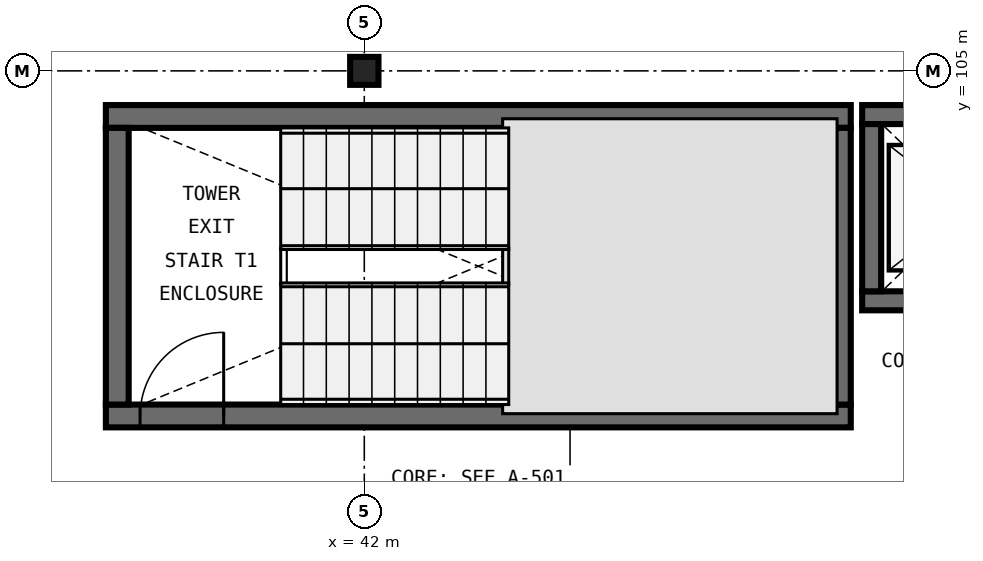
"""IFC4 building model, lengths in metres.
Left out: names, types, materials, properties, quantities, classifications, styles, units other than length and angle.
Written with IfcOpenShell. Run it as: python <this file> out.ifc"""

import sys

from ifc_helpers import new_model, si_unit, direction, frame, frame_2d, origin, origin_2d, place, context, subcontext, project, spatial, rectangle, i_section, extrude, element, fill, save


model = new_model("IFC4")
c1 = context("Model", 3, precision=1e-05, world=origin(), true_north=direction((0.0, 1.0)))
c2 = subcontext(c1, "Body", "Model", "MODEL_VIEW")
j1 = project(units=[si_unit("LENGTHUNIT", "METRE"), si_unit("PLANEANGLEUNIT", "RADIAN")], contexts=[c1])
p1 = place(None, origin())
s1 = spatial("IfcSite", under=j1, at=p1, CompositionType="ELEMENT")
p2 = place(p1, origin())
s2 = spatial("IfcBuilding", under=s1, at=p2, CompositionType="ELEMENT")
p3 = place(p2, frame((0.0, 0.0, 67.2)))
s3 = spatial("IfcBuildingStorey", under=s2, at=p3, CompositionType="ELEMENT", Elevation=67.2)
p4 = place(p3, frame((42.0, 105.0, 0.0), z_axis=(0.0, 0.0, 1.0), x_axis=(1.0, 0.0, 0.0)))
e1 = element("IfcColumn", 1, at=p4, inside=s3, PredefinedType="COLUMN", context=c2, shape_type="SweptSolid", body=[
    extrude(i_section(OverallWidth=0.373, OverallDepth=0.368, WebThickness=0.015, FlangeThickness=0.024, FilletRadius=0.031, at=origin_2d()), origin(), (0.0, 0.0, 1.0), 3.6),
])
p5 = place(p3, frame((38.6, 100.46, 0.0), z_axis=(0.0, 0.0, 1.0), x_axis=(1.0, 0.0, 0.0)))
e2 = element("IfcWall", 2, at=p5, inside=s3, PredefinedType="SHEAR", context=c2, shape_type="SweptSolid", body=[
    extrude(rectangle(XDim=9.8, YDim=0.3, at=frame_2d((4.9, 0.0))), origin(), (0.0, 0.0, 1.0), 3.6),
])
p6 = place(p5, frame((0.45, 0.0, 0.0)))
e3 = element("IfcOpeningElement", 3, at=p6, cuts=e2, PredefinedType="OPENING", context=c2, shape_type="SweptSolid", body=[
    extrude(rectangle(XDim=1.1, YDim=2.2, at=frame_2d((0.55, 1.1))), frame((0.0, 0.165, 0.0), z_axis=(0.0, -1.0, 0.0), x_axis=(1.0, 0.0, 0.0)), (0.0, 0.0, 1.0), 0.33),
])
p7 = place(p3, frame((48.4, 104.4, 0.0), z_axis=(0.0, 0.0, 1.0), x_axis=(-1.0, 0.0, 0.0)))
e4 = element("IfcWall", 4, at=p7, inside=s3, PredefinedType="SHEAR", context=c2, shape_type="SweptSolid", body=[
    extrude(rectangle(XDim=9.8, YDim=0.3, at=frame_2d((4.9, 0.0))), origin(), (0.0, 0.0, 1.0), 3.6),
])
for number, where, z_axis, x_axis in (
    (5, (38.75, 104.25, 0.0), (0.0, 0.0, 1.0), (0.0, -1.0, 0.0)),
    (6, (48.25, 100.61, 0.0), (0.0, 0.0, 1.0), (0.0, 1.0, 0.0)),
):
    element("IfcWall", number, at=place(p3, frame(where, z_axis=z_axis, x_axis=x_axis)), inside=s3, PredefinedType="SHEAR", context=c2, shape_type="SweptSolid", body=[
        extrude(rectangle(XDim=3.64, YDim=0.3, at=frame_2d((1.82, 0.0))), origin(), (0.0, 0.0, 1.0), 3.6),
    ])
p8 = place(p3, frame((48.55, 101.975, 0.0), z_axis=(0.0, 0.0, 1.0), x_axis=(1.0, 0.0, 0.0)))
e7 = element("IfcWall", 7, at=p8, inside=s3, PredefinedType="SHEAR", context=c2, shape_type="SweptSolid", body=[
    extrude(rectangle(XDim=2.8, YDim=0.25, at=frame_2d((1.4, 0.0))), origin(), (0.0, 0.0, 1.0), 3.6),
])
p9 = place(p8, frame((0.8, 0.0, 0.0)))
e8 = element("IfcOpeningElement", 8, at=p9, cuts=e7, PredefinedType="OPENING", context=c2, shape_type="SweptSolid", body=[
    extrude(rectangle(XDim=1.2, YDim=2.2, at=frame_2d((0.6, 1.1))), frame((0.0, 0.14, 0.0), z_axis=(0.0, -1.0, 0.0), x_axis=(1.0, 0.0, 0.0)), (0.0, 0.0, 1.0), 0.28),
])
p10 = place(p3, frame((51.35, 104.425, 0.0), z_axis=(0.0, 0.0, 1.0), x_axis=(-1.0, 0.0, 0.0)))
e9 = element("IfcWall", 9, at=p10, inside=s3, PredefinedType="SHEAR", context=c2, shape_type="SweptSolid", body=[
    extrude(rectangle(XDim=2.8, YDim=0.25, at=frame_2d((1.4, 0.0))), origin(), (0.0, 0.0, 1.0), 3.6),
])
p11 = place(p3, frame((48.675, 104.3, 0.0), z_axis=(0.0, 0.0, 1.0), x_axis=(0.0, -1.0, 0.0)))
e10 = element("IfcWall", 10, at=p11, inside=s3, PredefinedType="SHEAR", context=c2, shape_type="SweptSolid", body=[
    extrude(rectangle(XDim=2.2, YDim=0.25, at=frame_2d((1.1, 0.0))), origin(), (0.0, 0.0, 1.0), 3.6),
])
p12 = place(p6, origin())
e11 = element("IfcDoor", 11, at=p12, inside=s3, OperationType="SINGLE_SWING_RIGHT", PredefinedType="DOOR", context=c2, shape_type="SweptSolid", body=[
    extrude(rectangle(XDim=1.1, YDim=2.2, at=frame_2d((0.55, 1.1))), frame((0.0, 0.025, 0.0), z_axis=(0.0, -1.0, 0.0), x_axis=(1.0, 0.0, 0.0)), (0.0, 0.0, 1.0), 0.05),
])
fill(e3, e11)
save(model, sys.argv[1])
